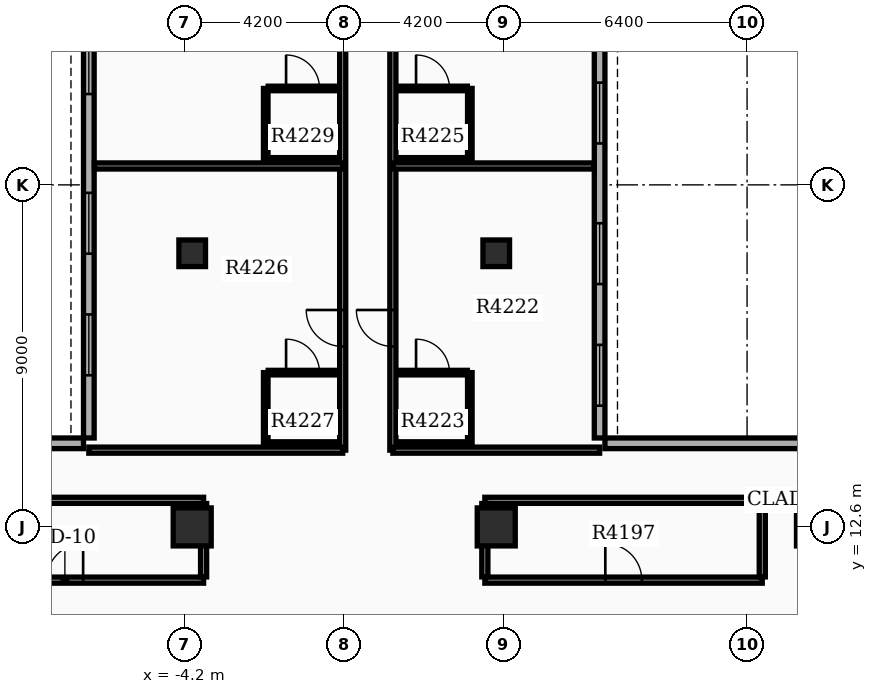
"""IFC4 building model, lengths in metres.
Left out: names, types, materials, properties, quantities, classifications, styles, units other than length and angle.
Written with IfcOpenShell. Run it as: python <this file> out.ifc"""

import sys

from ifc_helpers import new_model, si_unit, direction, frame, frame_2d, origin, origin_2d, place, context, subcontext, project, spatial, rectangle, extrude, element, fill, save


model = new_model("IFC4")
c1 = context("Model", 3, precision=1e-05, world=origin(), true_north=direction((0.0, 1.0)))
c2 = subcontext(c1, "Body", "Model", "MODEL_VIEW")
j1 = project(units=[si_unit("LENGTHUNIT", "METRE"), si_unit("PLANEANGLEUNIT", "RADIAN")], contexts=[c1])
p1 = place(None, origin())
s1 = spatial("IfcSite", under=j1, at=p1, CompositionType="ELEMENT")
p2 = place(p1, origin())
s2 = spatial("IfcBuilding", under=s1, at=p2, CompositionType="ELEMENT")
p3 = place(p2, frame((0.0, 0.0, 265.5)))
s3 = spatial("IfcBuildingStorey", under=s2, at=p3, CompositionType="ELEMENT", Elevation=265.5)
for number, where, z_axis, x_axis in (
    (1, (12.4, 12.6, 0.0), (0.0, 0.0, 1.0), (1.0, 0.0, 0.0)),
    (2, (4.0, 12.6, 0.0), (0.0, 0.0, 1.0), (1.0, 0.0, 0.0)),
    (3, (-4.0, 12.6, 0.0), (0.0, 0.0, 1.0), (1.0, 0.0, 0.0)),
):
    element("IfcColumn", number, at=place(p3, frame(where, z_axis=z_axis, x_axis=x_axis)), inside=s3, PredefinedType="COLUMN", context=c2, shape_type="SweptSolid", body=[
        extrude(rectangle(XDim=1.0, YDim=1.0, at=origin_2d()), origin(), (0.0, 0.0, 1.0), 3.9),
    ])
for number, where, z_axis, x_axis in (
    (4, (-4.0, 19.8, 0.0), (0.0, 0.0, 1.0), (1.0, 0.0, 0.0)),
    (5, (4.0, 19.8, 0.0), (0.0, 0.0, 1.0), (1.0, 0.0, 0.0)),
):
    element("IfcColumn", number, at=place(p3, frame(where, z_axis=z_axis, x_axis=x_axis)), inside=s3, PredefinedType="COLUMN", context=c2, shape_type="SweptSolid", body=[
        extrude(rectangle(XDim=0.7, YDim=0.7, at=origin_2d()), origin(), (0.0, 0.0, 1.0), 3.9),
    ])
p4 = place(p3, frame((6.72, 14.94, 0.0), z_axis=(0.0, 0.0, 1.0), x_axis=(0.0, 1.0, 0.0)))
e6 = element("IfcWall", 6, at=p4, inside=s3, PredefinedType="STANDARD", context=c2, shape_type="SweptSolid", body=[
    extrude(rectangle(XDim=14.7, YDim=0.28, at=frame_2d((7.35, 0.0))), origin(), (0.0, 0.0, 1.0), 3.18),
])
p5 = place(p4, frame((0.85, 0.0, 0.8)))
e7 = element("IfcOpeningElement", 7, at=p5, cuts=e6, PredefinedType="OPENING", context=c2, shape_type="SweptSolid", body=[
    extrude(rectangle(XDim=1.6, YDim=1.7, at=frame_2d((0.8, 0.85))), frame((0.0, 0.15, 0.0), z_axis=(0.0, -1.0, 0.0), x_axis=(1.0, 0.0, 0.0)), (0.0, 0.0, 1.0), 0.3),
])
p6 = place(p4, frame((4.05, 0.0, 0.8)))
e8 = element("IfcOpeningElement", 8, at=p6, cuts=e6, PredefinedType="OPENING", context=c2, shape_type="SweptSolid", body=[
    extrude(rectangle(XDim=1.6, YDim=1.7, at=frame_2d((0.8, 0.85))), frame((0.0, 0.15, 0.0), z_axis=(0.0, -1.0, 0.0), x_axis=(1.0, 0.0, 0.0)), (0.0, 0.0, 1.0), 0.3),
])
p7 = place(p4, frame((7.75, 0.0, 0.8)))
e9 = element("IfcOpeningElement", 9, at=p7, cuts=e6, PredefinedType="OPENING", context=c2, shape_type="SweptSolid", body=[
    extrude(rectangle(XDim=1.6, YDim=1.7, at=frame_2d((0.8, 0.85))), frame((0.0, 0.15, 0.0), z_axis=(0.0, -1.0, 0.0), x_axis=(1.0, 0.0, 0.0)), (0.0, 0.0, 1.0), 0.3),
])
p8 = place(p4, frame((10.95, 0.0, 0.8)))
e10 = element("IfcOpeningElement", 10, at=p8, cuts=e6, PredefinedType="OPENING", context=c2, shape_type="SweptSolid", body=[
    extrude(rectangle(XDim=1.6, YDim=1.7, at=frame_2d((0.8, 0.85))), frame((0.0, 0.15, 0.0), z_axis=(0.0, -1.0, 0.0), x_axis=(1.0, 0.0, 0.0)), (0.0, 0.0, 1.0), 0.3),
])
p9 = place(p3, frame((-6.72, 29.64, 0.0), z_axis=(0.0, 0.0, 1.0), x_axis=(0.0, -1.0, 0.0)))
e11 = element("IfcWall", 11, at=p9, inside=s3, PredefinedType="STANDARD", context=c2, shape_type="SweptSolid", body=[
    extrude(rectangle(XDim=14.7, YDim=0.28, at=frame_2d((7.35, 0.0))), origin(), (0.0, 0.0, 1.0), 3.18),
])
p10 = place(p9, frame((0.85, 0.0, 0.8)))
e12 = element("IfcOpeningElement", 12, at=p10, cuts=e11, PredefinedType="OPENING", context=c2, shape_type="SweptSolid", body=[
    extrude(rectangle(XDim=1.6, YDim=1.7, at=frame_2d((0.8, 0.85))), frame((0.0, 0.15, 0.0), z_axis=(0.0, -1.0, 0.0), x_axis=(1.0, 0.0, 0.0)), (0.0, 0.0, 1.0), 0.3),
])
p11 = place(p9, frame((4.05, 0.0, 0.8)))
e13 = element("IfcOpeningElement", 13, at=p11, cuts=e11, PredefinedType="OPENING", context=c2, shape_type="SweptSolid", body=[
    extrude(rectangle(XDim=1.6, YDim=1.7, at=frame_2d((0.8, 0.85))), frame((0.0, 0.15, 0.0), z_axis=(0.0, -1.0, 0.0), x_axis=(1.0, 0.0, 0.0)), (0.0, 0.0, 1.0), 0.3),
])
p12 = place(p9, frame((8.25, 0.0, 0.8)))
e14 = element("IfcOpeningElement", 14, at=p12, cuts=e11, PredefinedType="OPENING", context=c2, shape_type="SweptSolid", body=[
    extrude(rectangle(XDim=1.6, YDim=1.7, at=frame_2d((0.8, 0.85))), frame((0.0, 0.15, 0.0), z_axis=(0.0, -1.0, 0.0), x_axis=(1.0, 0.0, 0.0)), (0.0, 0.0, 1.0), 0.3),
])
p13 = place(p9, frame((11.45, 0.0, 0.8)))
e15 = element("IfcOpeningElement", 15, at=p13, cuts=e11, PredefinedType="OPENING", context=c2, shape_type="SweptSolid", body=[
    extrude(rectangle(XDim=1.6, YDim=1.7, at=frame_2d((0.8, 0.85))), frame((0.0, 0.15, 0.0), z_axis=(0.0, -1.0, 0.0), x_axis=(1.0, 0.0, 0.0)), (0.0, 0.0, 1.0), 0.3),
])
for number, where, z_axis, x_axis in (
    (16, (13.16, 14.8, 0.0), (0.0, 0.0, 1.0), (-1.0, 0.0, 0.0)),
    (17, (-13.16, 14.8, 0.0), (0.0, 0.0, 1.0), (1.0, 0.0, 0.0)),
):
    element("IfcWall", number, at=place(p3, frame(where, z_axis=z_axis, x_axis=x_axis)), inside=s3, PredefinedType="STANDARD", context=c2, shape_type="SweptSolid", body=[
        extrude(rectangle(XDim=6.3, YDim=0.28, at=frame_2d((3.15, 0.0))), origin(), (0.0, 0.0, 1.0), 3.18),
    ])
p14 = place(p3, frame((-11.0, 11.2, 0.0), z_axis=(0.0, 0.0, 1.0), x_axis=(1.0, 0.0, 0.0)))
e18 = element("IfcWall", 18, at=p14, inside=s3, PredefinedType="PARTITIONING", context=c2, shape_type="SweptSolid", body=[
    extrude(rectangle(XDim=7.3, YDim=0.16, at=frame_2d((3.65, 0.0))), origin(), (0.0, 0.0, 1.0), 3.17),
])
p15 = place(p14, frame((3.17, 0.0, 0.0)))
e19 = element("IfcOpeningElement", 19, at=p15, cuts=e18, PredefinedType="OPENING", context=c2, shape_type="SweptSolid", body=[
    extrude(rectangle(XDim=0.96, YDim=2.15, at=frame_2d((0.48, 1.075))), frame((0.0, 0.09, 0.0), z_axis=(0.0, -1.0, 0.0), x_axis=(1.0, 0.0, 0.0)), (0.0, 0.0, 1.0), 0.18),
])
p16 = place(p3, frame((-11.0, 13.3, 0.0), z_axis=(0.0, 0.0, 1.0), x_axis=(1.0, 0.0, 0.0)))
e20 = element("IfcWall", 20, at=p16, inside=s3, PredefinedType="PARTITIONING", context=c2, shape_type="SweptSolid", body=[
    extrude(rectangle(XDim=7.3, YDim=0.16, at=frame_2d((3.65, 0.0))), origin(), (0.0, 0.0, 1.0), 3.17),
])
p17 = place(p3, frame((-3.7, 11.285, 0.0), z_axis=(0.0, 0.0, 1.0), x_axis=(0.0, 1.0, 0.0)))
e21 = element("IfcWall", 21, at=p17, inside=s3, PredefinedType="PARTITIONING", context=c2, shape_type="SweptSolid", body=[
    extrude(rectangle(XDim=1.93, YDim=0.16, at=frame_2d((0.965, 0.0))), origin(), (0.0, 0.0, 1.0), 3.17),
])
p18 = place(p3, frame((3.7, 11.2, 0.0), z_axis=(0.0, 0.0, 1.0), x_axis=(1.0, 0.0, 0.0)))
e22 = element("IfcWall", 22, at=p18, inside=s3, PredefinedType="PARTITIONING", context=c2, shape_type="SweptSolid", body=[
    extrude(rectangle(XDim=7.3, YDim=0.16, at=frame_2d((3.65, 0.0))), origin(), (0.0, 0.0, 1.0), 3.17),
])
p19 = place(p18, frame((3.17, 0.0, 0.0)))
e23 = element("IfcOpeningElement", 23, at=p19, cuts=e22, PredefinedType="OPENING", context=c2, shape_type="SweptSolid", body=[
    extrude(rectangle(XDim=0.96, YDim=2.15, at=frame_2d((0.48, 1.075))), frame((0.0, 0.09, 0.0), z_axis=(0.0, -1.0, 0.0), x_axis=(1.0, 0.0, 0.0)), (0.0, 0.0, 1.0), 0.18),
])
p20 = place(p3, frame((3.7, 13.3, 0.0), z_axis=(0.0, 0.0, 1.0), x_axis=(1.0, 0.0, 0.0)))
e24 = element("IfcWall", 24, at=p20, inside=s3, PredefinedType="PARTITIONING", context=c2, shape_type="SweptSolid", body=[
    extrude(rectangle(XDim=7.3, YDim=0.16, at=frame_2d((3.65, 0.0))), origin(), (0.0, 0.0, 1.0), 3.17),
])
for number, where, z_axis, x_axis in (
    (25, (3.7, 11.285, 0.0), (0.0, 0.0, 1.0), (0.0, 1.0, 0.0)),
    (26, (11.0, 11.285, 0.0), (0.0, 0.0, 1.0), (0.0, 1.0, 0.0)),
):
    element("IfcWall", number, at=place(p3, frame(where, z_axis=z_axis, x_axis=x_axis)), inside=s3, PredefinedType="PARTITIONING", context=c2, shape_type="SweptSolid", body=[
        extrude(rectangle(XDim=1.93, YDim=0.16, at=frame_2d((0.965, 0.0))), origin(), (0.0, 0.0, 1.0), 3.17),
    ])
p21 = place(p3, frame((1.28, 14.62, 0.0), z_axis=(0.0, 0.0, 1.0), x_axis=(0.0, 1.0, 0.0)))
e27 = element("IfcWall", 27, at=p21, inside=s3, PredefinedType="PARTITIONING", context=c2, shape_type="SweptSolid", body=[
    extrude(rectangle(XDim=15.012, YDim=0.16, at=frame_2d((7.506, 0.0))), origin(), (0.0, 0.0, 1.0), 3.17),
])
p22 = place(p21, frame((2.728, 0.0, 0.0)))
e28 = element("IfcOpeningElement", 28, at=p22, cuts=e27, PredefinedType="OPENING", context=c2, shape_type="SweptSolid", body=[
    extrude(rectangle(XDim=0.96, YDim=2.15, at=frame_2d((0.48, 1.075))), frame((0.0, 0.09, 0.0), z_axis=(0.0, -1.0, 0.0), x_axis=(1.0, 0.0, 0.0)), (0.0, 0.0, 1.0), 0.18),
])
p23 = place(p21, frame((13.76, 0.0, 0.0)))
e29 = element("IfcOpeningElement", 29, at=p23, cuts=e27, PredefinedType="OPENING", context=c2, shape_type="SweptSolid", body=[
    extrude(rectangle(XDim=0.96, YDim=2.15, at=frame_2d((0.48, 1.075))), frame((0.0, 0.09, 0.0), z_axis=(0.0, -1.0, 0.0), x_axis=(1.0, 0.0, 0.0)), (0.0, 0.0, 1.0), 0.18),
])
p24 = place(p3, frame((1.28, 14.62, 0.0), z_axis=(0.0, 0.0, 1.0), x_axis=(1.0, 0.0, 0.0)))
e30 = element("IfcWall", 30, at=p24, inside=s3, PredefinedType="PARTITIONING", context=c2, shape_type="SweptSolid", body=[
    extrude(rectangle(XDim=5.44, YDim=0.16, at=frame_2d((2.72, 0.0))), origin(), (0.0, 0.0, 1.0), 3.17),
])
p25 = place(p3, frame((1.28, 22.097, 0.0), z_axis=(0.0, 0.0, 1.0), x_axis=(1.0, 0.0, 0.0)))
e31 = element("IfcWall", 31, at=p25, inside=s3, PredefinedType="PARTITIONING", context=c2, shape_type="SweptSolid", body=[
    extrude(rectangle(XDim=5.292, YDim=0.16, at=frame_2d((2.646, 0.0))), origin(), (0.0, 0.0, 1.0), 3.17),
])
p26 = place(p3, frame((1.42, 16.66, 0.0), z_axis=(0.0, 0.0, 1.0), x_axis=(1.0, 0.0, 0.0)))
e32 = element("IfcWall", 32, at=p26, inside=s3, PredefinedType="PARTITIONING", context=c2, shape_type="SweptSolid", body=[
    extrude(rectangle(XDim=1.82, YDim=0.12, at=frame_2d((0.91, 0.0))), origin(), (0.0, 0.0, 1.0), 3.17),
])
p27 = place(p26, frame((0.47, 0.0, 0.0)))
e33 = element("IfcOpeningElement", 33, at=p27, cuts=e32, PredefinedType="OPENING", context=c2, shape_type="SweptSolid", body=[
    extrude(rectangle(XDim=0.88, YDim=2.1, at=frame_2d((0.44, 1.05))), frame((0.0, 0.07, 0.0), z_axis=(0.0, -1.0, 0.0), x_axis=(1.0, 0.0, 0.0)), (0.0, 0.0, 1.0), 0.14),
])
p28 = place(p3, frame((1.42, 14.78, 0.0), z_axis=(0.0, 0.0, 1.0), x_axis=(1.0, 0.0, 0.0)))
e34 = element("IfcWall", 34, at=p28, inside=s3, PredefinedType="PARTITIONING", context=c2, shape_type="SweptSolid", body=[
    extrude(rectangle(XDim=1.82, YDim=0.12, at=frame_2d((0.91, 0.0))), origin(), (0.0, 0.0, 1.0), 3.17),
])
p29 = place(p3, frame((3.305, 14.78, 0.0), z_axis=(0.0, 0.0, 1.0), x_axis=(0.0, 1.0, 0.0)))
e35 = element("IfcWall", 35, at=p29, inside=s3, PredefinedType="PARTITIONING", context=c2, shape_type="SweptSolid", body=[
    extrude(rectangle(XDim=1.88, YDim=0.12, at=frame_2d((0.94, 0.0))), origin(), (0.0, 0.0, 1.0), 3.17),
])
p30 = place(p3, frame((1.42, 24.137, 0.0), z_axis=(0.0, 0.0, 1.0), x_axis=(1.0, 0.0, 0.0)))
e36 = element("IfcWall", 36, at=p30, inside=s3, PredefinedType="PARTITIONING", context=c2, shape_type="SweptSolid", body=[
    extrude(rectangle(XDim=1.82, YDim=0.12, at=frame_2d((0.91, 0.0))), origin(), (0.0, 0.0, 1.0), 3.17),
])
p31 = place(p30, frame((0.47, 0.0, 0.0)))
e37 = element("IfcOpeningElement", 37, at=p31, cuts=e36, PredefinedType="OPENING", context=c2, shape_type="SweptSolid", body=[
    extrude(rectangle(XDim=0.88, YDim=2.1, at=frame_2d((0.44, 1.05))), frame((0.0, 0.07, 0.0), z_axis=(0.0, -1.0, 0.0), x_axis=(1.0, 0.0, 0.0)), (0.0, 0.0, 1.0), 0.14),
])
p32 = place(p3, frame((1.42, 22.257, 0.0), z_axis=(0.0, 0.0, 1.0), x_axis=(1.0, 0.0, 0.0)))
e38 = element("IfcWall", 38, at=p32, inside=s3, PredefinedType="PARTITIONING", context=c2, shape_type="SweptSolid", body=[
    extrude(rectangle(XDim=1.82, YDim=0.12, at=frame_2d((0.91, 0.0))), origin(), (0.0, 0.0, 1.0), 3.17),
])
p33 = place(p3, frame((3.305, 22.257, 0.0), z_axis=(0.0, 0.0, 1.0), x_axis=(0.0, 1.0, 0.0)))
e39 = element("IfcWall", 39, at=p33, inside=s3, PredefinedType="PARTITIONING", context=c2, shape_type="SweptSolid", body=[
    extrude(rectangle(XDim=1.88, YDim=0.12, at=frame_2d((0.94, 0.0))), origin(), (0.0, 0.0, 1.0), 3.17),
])
p34 = place(p3, frame((-0.04, 14.62, 0.0), z_axis=(0.0, 0.0, 1.0), x_axis=(0.0, 1.0, 0.0)))
e40 = element("IfcWall", 40, at=p34, inside=s3, PredefinedType="PARTITIONING", context=c2, shape_type="SweptSolid", body=[
    extrude(rectangle(XDim=15.012, YDim=0.16, at=frame_2d((7.506, 0.0))), origin(), (0.0, 0.0, 1.0), 3.17),
])
p35 = place(p34, frame((2.728, 0.0, 0.0)))
e41 = element("IfcOpeningElement", 41, at=p35, cuts=e40, PredefinedType="OPENING", context=c2, shape_type="SweptSolid", body=[
    extrude(rectangle(XDim=0.96, YDim=2.15, at=frame_2d((0.48, 1.075))), frame((0.0, 0.09, 0.0), z_axis=(0.0, -1.0, 0.0), x_axis=(1.0, 0.0, 0.0)), (0.0, 0.0, 1.0), 0.18),
])
p36 = place(p34, frame((13.76, 0.0, 0.0)))
e42 = element("IfcOpeningElement", 42, at=p36, cuts=e40, PredefinedType="OPENING", context=c2, shape_type="SweptSolid", body=[
    extrude(rectangle(XDim=0.96, YDim=2.15, at=frame_2d((0.48, 1.075))), frame((0.0, 0.09, 0.0), z_axis=(0.0, -1.0, 0.0), x_axis=(1.0, 0.0, 0.0)), (0.0, 0.0, 1.0), 0.18),
])
p37 = place(p3, frame((-0.04, 14.62, 0.0), z_axis=(0.0, 0.0, 1.0), x_axis=(-1.0, 0.0, 0.0)))
e43 = element("IfcWall", 43, at=p37, inside=s3, PredefinedType="PARTITIONING", context=c2, shape_type="SweptSolid", body=[
    extrude(rectangle(XDim=6.68, YDim=0.16, at=frame_2d((3.34, 0.0))), origin(), (0.0, 0.0, 1.0), 3.17),
])
p38 = place(p3, frame((-0.04, 22.097, 0.0), z_axis=(0.0, 0.0, 1.0), x_axis=(-1.0, 0.0, 0.0)))
e44 = element("IfcWall", 44, at=p38, inside=s3, PredefinedType="PARTITIONING", context=c2, shape_type="SweptSolid", body=[
    extrude(rectangle(XDim=6.532, YDim=0.16, at=frame_2d((3.266, 0.0))), origin(), (0.0, 0.0, 1.0), 3.17),
])
p39 = place(p3, frame((-2.0, 16.66, 0.0), z_axis=(0.0, 0.0, 1.0), x_axis=(1.0, 0.0, 0.0)))
e45 = element("IfcWall", 45, at=p39, inside=s3, PredefinedType="PARTITIONING", context=c2, shape_type="SweptSolid", body=[
    extrude(rectangle(XDim=1.82, YDim=0.12, at=frame_2d((0.91, 0.0))), origin(), (0.0, 0.0, 1.0), 3.17),
])
p40 = place(p39, frame((0.47, 0.0, 0.0)))
e46 = element("IfcOpeningElement", 46, at=p40, cuts=e45, PredefinedType="OPENING", context=c2, shape_type="SweptSolid", body=[
    extrude(rectangle(XDim=0.88, YDim=2.1, at=frame_2d((0.44, 1.05))), frame((0.0, 0.07, 0.0), z_axis=(0.0, -1.0, 0.0), x_axis=(1.0, 0.0, 0.0)), (0.0, 0.0, 1.0), 0.14),
])
p41 = place(p3, frame((-2.0, 14.78, 0.0), z_axis=(0.0, 0.0, 1.0), x_axis=(1.0, 0.0, 0.0)))
e47 = element("IfcWall", 47, at=p41, inside=s3, PredefinedType="PARTITIONING", context=c2, shape_type="SweptSolid", body=[
    extrude(rectangle(XDim=1.82, YDim=0.12, at=frame_2d((0.91, 0.0))), origin(), (0.0, 0.0, 1.0), 3.17),
])
p42 = place(p3, frame((-2.065, 14.78, 0.0), z_axis=(0.0, 0.0, 1.0), x_axis=(0.0, 1.0, 0.0)))
e48 = element("IfcWall", 48, at=p42, inside=s3, PredefinedType="PARTITIONING", context=c2, shape_type="SweptSolid", body=[
    extrude(rectangle(XDim=1.88, YDim=0.12, at=frame_2d((0.94, 0.0))), origin(), (0.0, 0.0, 1.0), 3.17),
])
p43 = place(p3, frame((-2.0, 24.137, 0.0), z_axis=(0.0, 0.0, 1.0), x_axis=(1.0, 0.0, 0.0)))
e49 = element("IfcWall", 49, at=p43, inside=s3, PredefinedType="PARTITIONING", context=c2, shape_type="SweptSolid", body=[
    extrude(rectangle(XDim=1.82, YDim=0.12, at=frame_2d((0.91, 0.0))), origin(), (0.0, 0.0, 1.0), 3.17),
])
p44 = place(p43, frame((0.47, 0.0, 0.0)))
e50 = element("IfcOpeningElement", 50, at=p44, cuts=e49, PredefinedType="OPENING", context=c2, shape_type="SweptSolid", body=[
    extrude(rectangle(XDim=0.88, YDim=2.1, at=frame_2d((0.44, 1.05))), frame((0.0, 0.07, 0.0), z_axis=(0.0, -1.0, 0.0), x_axis=(1.0, 0.0, 0.0)), (0.0, 0.0, 1.0), 0.14),
])
p45 = place(p3, frame((-2.0, 22.257, 0.0), z_axis=(0.0, 0.0, 1.0), x_axis=(1.0, 0.0, 0.0)))
e51 = element("IfcWall", 51, at=p45, inside=s3, PredefinedType="PARTITIONING", context=c2, shape_type="SweptSolid", body=[
    extrude(rectangle(XDim=1.82, YDim=0.12, at=frame_2d((0.91, 0.0))), origin(), (0.0, 0.0, 1.0), 3.17),
])
p46 = place(p3, frame((-2.065, 22.257, 0.0), z_axis=(0.0, 0.0, 1.0), x_axis=(0.0, 1.0, 0.0)))
e52 = element("IfcWall", 52, at=p46, inside=s3, PredefinedType="PARTITIONING", context=c2, shape_type="SweptSolid", body=[
    extrude(rectangle(XDim=1.88, YDim=0.12, at=frame_2d((0.94, 0.0))), origin(), (0.0, 0.0, 1.0), 3.17),
])
p47 = place(p5, origin())
e53 = element("IfcWindow", 53, at=p47, inside=s3, PartitioningType="SINGLE_PANEL", PredefinedType="WINDOW", context=c2, shape_type="SweptSolid", body=[
    extrude(rectangle(XDim=1.6, YDim=1.7, at=frame_2d((0.8, 0.85))), frame((0.0, 0.03, 0.0), z_axis=(0.0, -1.0, 0.0), x_axis=(1.0, 0.0, 0.0)), (0.0, 0.0, 1.0), 0.06),
])
fill(e7, e53)
p48 = place(p6, origin())
e54 = element("IfcWindow", 54, at=p48, inside=s3, PartitioningType="SINGLE_PANEL", PredefinedType="WINDOW", context=c2, shape_type="SweptSolid", body=[
    extrude(rectangle(XDim=1.6, YDim=1.7, at=frame_2d((0.8, 0.85))), frame((0.0, 0.03, 0.0), z_axis=(0.0, -1.0, 0.0), x_axis=(1.0, 0.0, 0.0)), (0.0, 0.0, 1.0), 0.06),
])
fill(e8, e54)
p49 = place(p7, origin())
e55 = element("IfcWindow", 55, at=p49, inside=s3, PartitioningType="SINGLE_PANEL", PredefinedType="WINDOW", context=c2, shape_type="SweptSolid", body=[
    extrude(rectangle(XDim=1.6, YDim=1.7, at=frame_2d((0.8, 0.85))), frame((0.0, 0.03, 0.0), z_axis=(0.0, -1.0, 0.0), x_axis=(1.0, 0.0, 0.0)), (0.0, 0.0, 1.0), 0.06),
])
fill(e9, e55)
p50 = place(p11, origin())
e56 = element("IfcWindow", 56, at=p50, inside=s3, PartitioningType="SINGLE_PANEL", PredefinedType="WINDOW", context=c2, shape_type="SweptSolid", body=[
    extrude(rectangle(XDim=1.6, YDim=1.7, at=frame_2d((0.8, 0.85))), frame((0.0, 0.03, 0.0), z_axis=(0.0, -1.0, 0.0), x_axis=(1.0, 0.0, 0.0)), (0.0, 0.0, 1.0), 0.06),
])
fill(e13, e56)
p51 = place(p12, origin())
e57 = element("IfcWindow", 57, at=p51, inside=s3, PartitioningType="SINGLE_PANEL", PredefinedType="WINDOW", context=c2, shape_type="SweptSolid", body=[
    extrude(rectangle(XDim=1.6, YDim=1.7, at=frame_2d((0.8, 0.85))), frame((0.0, 0.03, 0.0), z_axis=(0.0, -1.0, 0.0), x_axis=(1.0, 0.0, 0.0)), (0.0, 0.0, 1.0), 0.06),
])
fill(e14, e57)
p52 = place(p13, origin())
e58 = element("IfcWindow", 58, at=p52, inside=s3, PartitioningType="SINGLE_PANEL", PredefinedType="WINDOW", context=c2, shape_type="SweptSolid", body=[
    extrude(rectangle(XDim=1.6, YDim=1.7, at=frame_2d((0.8, 0.85))), frame((0.0, 0.03, 0.0), z_axis=(0.0, -1.0, 0.0), x_axis=(1.0, 0.0, 0.0)), (0.0, 0.0, 1.0), 0.06),
])
fill(e15, e58)
p53 = place(p15, origin())
e59 = element("IfcDoor", 59, at=p53, inside=s3, OperationType="SINGLE_SWING_RIGHT", PredefinedType="DOOR", context=c2, shape_type="SweptSolid", body=[
    extrude(rectangle(XDim=0.96, YDim=2.15, at=frame_2d((0.48, 1.075))), frame((0.0, 0.025, 0.0), z_axis=(0.0, -1.0, 0.0), x_axis=(1.0, 0.0, 0.0)), (0.0, 0.0, 1.0), 0.05),
])
fill(e19, e59)
p54 = place(p19, origin())
e60 = element("IfcDoor", 60, at=p54, inside=s3, OperationType="SINGLE_SWING_LEFT", PredefinedType="DOOR", context=c2, shape_type="SweptSolid", body=[
    extrude(rectangle(XDim=0.96, YDim=2.15, at=frame_2d((0.48, 1.075))), frame((0.0, 0.025, 0.0), z_axis=(0.0, -1.0, 0.0), x_axis=(1.0, 0.0, 0.0)), (0.0, 0.0, 1.0), 0.05),
])
fill(e23, e60)
p55 = place(p22, origin())
e61 = element("IfcDoor", 61, at=p55, inside=s3, OperationType="SINGLE_SWING_RIGHT", PredefinedType="DOOR", context=c2, shape_type="SweptSolid", body=[
    extrude(rectangle(XDim=0.96, YDim=2.15, at=frame_2d((0.48, 1.075))), frame((0.0, 0.025, 0.0), z_axis=(0.0, -1.0, 0.0), x_axis=(1.0, 0.0, 0.0)), (0.0, 0.0, 1.0), 0.05),
])
fill(e28, e61)
p56 = place(p27, origin())
e62 = element("IfcDoor", 62, at=p56, inside=s3, OperationType="SINGLE_SWING_LEFT", PredefinedType="DOOR", context=c2, shape_type="SweptSolid", body=[
    extrude(rectangle(XDim=0.88, YDim=2.1, at=frame_2d((0.44, 1.05))), frame((0.0, 0.025, 0.0), z_axis=(0.0, -1.0, 0.0), x_axis=(1.0, 0.0, 0.0)), (0.0, 0.0, 1.0), 0.05),
])
fill(e33, e62)
p57 = place(p31, origin())
e63 = element("IfcDoor", 63, at=p57, inside=s3, OperationType="SINGLE_SWING_LEFT", PredefinedType="DOOR", context=c2, shape_type="SweptSolid", body=[
    extrude(rectangle(XDim=0.88, YDim=2.1, at=frame_2d((0.44, 1.05))), frame((0.0, 0.025, 0.0), z_axis=(0.0, -1.0, 0.0), x_axis=(1.0, 0.0, 0.0)), (0.0, 0.0, 1.0), 0.05),
])
fill(e37, e63)
p58 = place(p35, origin())
e64 = element("IfcDoor", 64, at=p58, inside=s3, OperationType="SINGLE_SWING_RIGHT", PredefinedType="DOOR", context=c2, shape_type="SweptSolid", body=[
    extrude(rectangle(XDim=0.96, YDim=2.15, at=frame_2d((0.48, 1.075))), frame((0.0, 0.025, 0.0), z_axis=(0.0, -1.0, 0.0), x_axis=(1.0, 0.0, 0.0)), (0.0, 0.0, 1.0), 0.05),
])
fill(e41, e64)
p59 = place(p40, origin())
e65 = element("IfcDoor", 65, at=p59, inside=s3, OperationType="SINGLE_SWING_LEFT", PredefinedType="DOOR", context=c2, shape_type="SweptSolid", body=[
    extrude(rectangle(XDim=0.88, YDim=2.1, at=frame_2d((0.44, 1.05))), frame((0.0, 0.025, 0.0), z_axis=(0.0, -1.0, 0.0), x_axis=(1.0, 0.0, 0.0)), (0.0, 0.0, 1.0), 0.05),
])
fill(e46, e65)
p60 = place(p44, origin())
e66 = element("IfcDoor", 66, at=p60, inside=s3, OperationType="SINGLE_SWING_LEFT", PredefinedType="DOOR", context=c2, shape_type="SweptSolid", body=[
    extrude(rectangle(XDim=0.88, YDim=2.1, at=frame_2d((0.44, 1.05))), frame((0.0, 0.025, 0.0), z_axis=(0.0, -1.0, 0.0), x_axis=(1.0, 0.0, 0.0)), (0.0, 0.0, 1.0), 0.05),
])
fill(e50, e66)
save(model, sys.argv[1])
